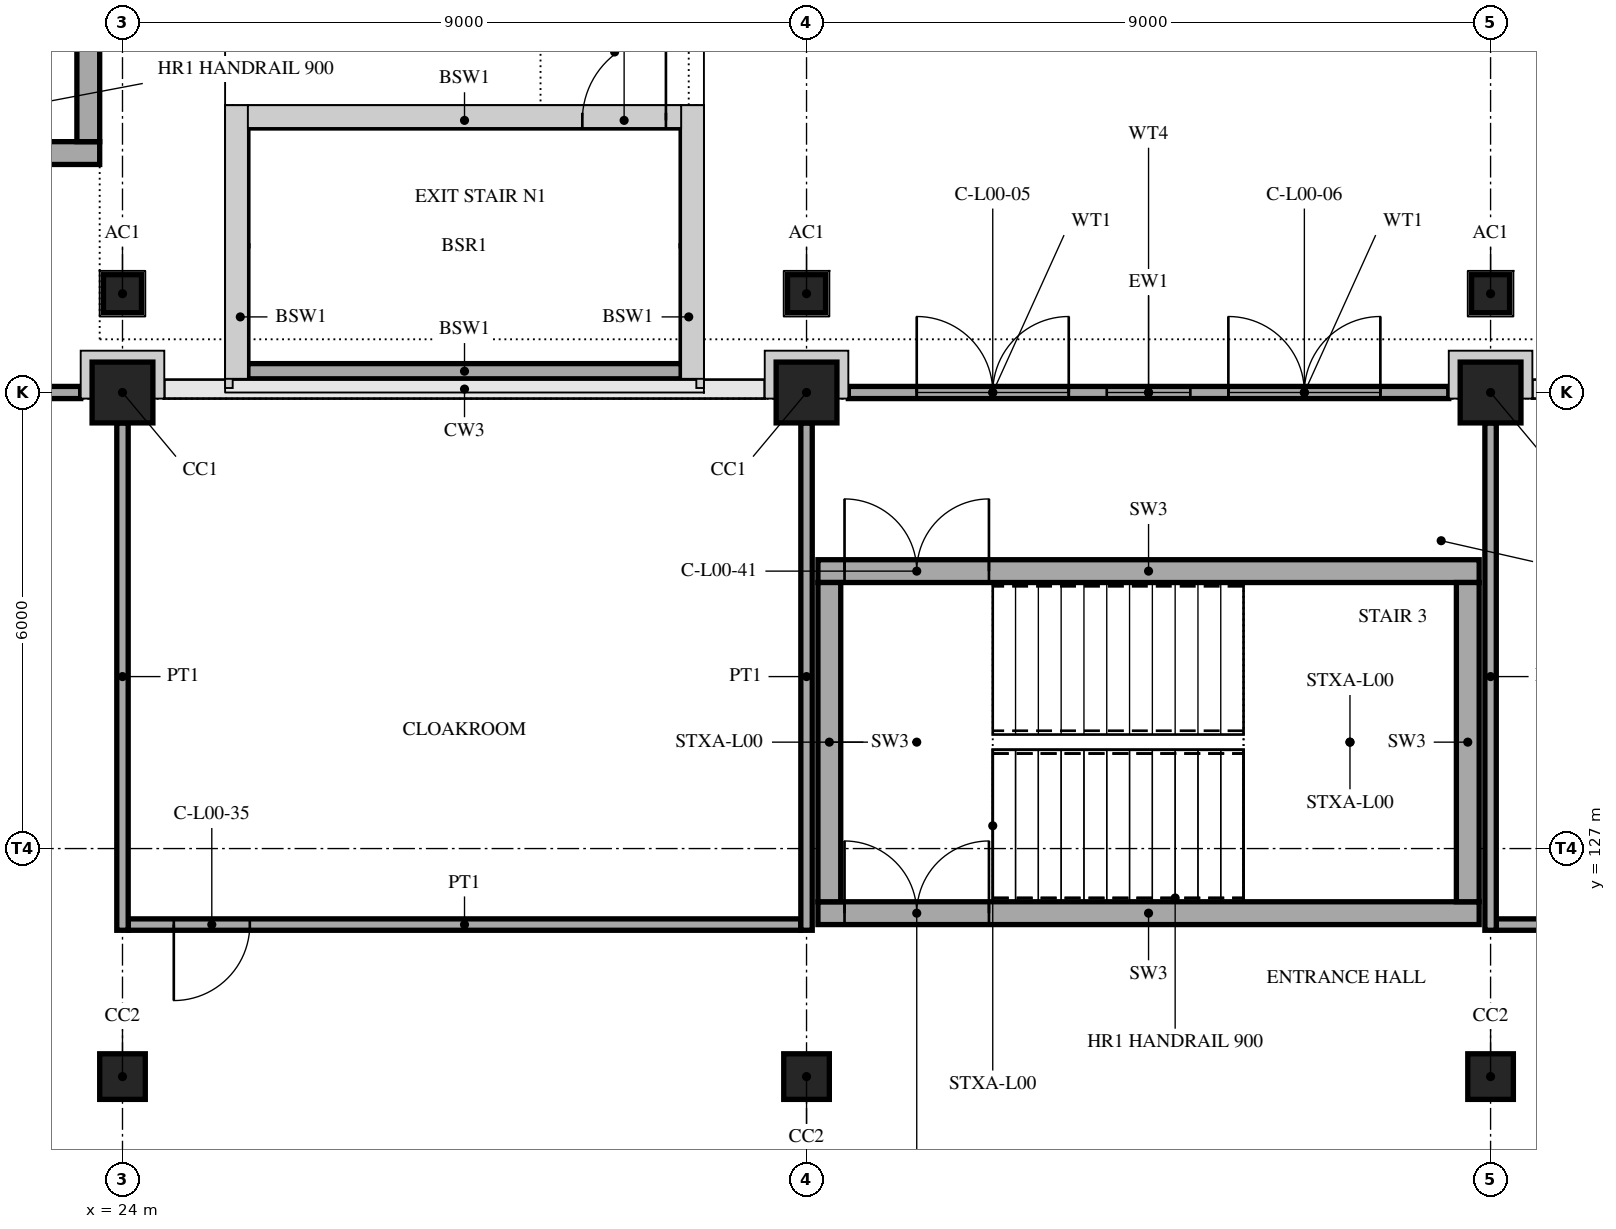
"""IFC4 building model, lengths in metres.
Left out: names, types, materials, properties, quantities, classifications, styles, units other than length and angle.
Written with IfcOpenShell. Run it as: python <this file> out.ifc"""

import sys

from ifc_helpers import new_model, si_unit, direction, frame, frame_2d, origin, origin_2d, place, context, subcontext, project, spatial, rectangle, extrude, element, fill, save


model = new_model("IFC4")
c1 = context("Model", 3, precision=1e-05, world=origin(), true_north=direction((0.0, 1.0)))
c2 = subcontext(c1, "Body", "Model", "MODEL_VIEW")
j1 = project(units=[si_unit("LENGTHUNIT", "METRE"), si_unit("PLANEANGLEUNIT", "RADIAN")], contexts=[c1])
p1 = place(None, origin())
s1 = spatial("IfcSite", under=j1, at=p1, CompositionType="ELEMENT")
p2 = place(p1, origin())
s2 = spatial("IfcBuilding", under=s1, at=p2, CompositionType="ELEMENT")
p3 = place(p2, origin())
s3 = spatial("IfcBuildingStorey", under=s2, at=p3, CompositionType="ELEMENT", Elevation=0.0)
p4 = place(p3, frame((24.0, 124.0, 0.0), z_axis=(0.0, 0.0, 1.0), x_axis=(1.0, 0.0, 0.0)))
e1 = element("IfcColumn", 1, at=p4, inside=s3, PredefinedType="COLUMN", context=c2, shape_type="SweptSolid", body=[
    extrude(rectangle(XDim=0.6, YDim=0.6, at=origin_2d()), origin(), (0.0, 0.0, 1.0), 5.0),
])
p5 = place(p3, frame((24.0, 133.0, 0.0), z_axis=(0.0, 0.0, 1.0), x_axis=(1.0, 0.0, 0.0)))
e2 = element("IfcColumn", 2, at=p5, inside=s3, PredefinedType="COLUMN", context=c2, shape_type="SweptSolid", body=[
    extrude(rectangle(XDim=0.8, YDim=0.8, at=origin_2d()), origin(), (0.0, 0.0, 1.0), 5.0),
])
p6 = place(p3, frame((33.0, 124.0, 0.0), z_axis=(0.0, 0.0, 1.0), x_axis=(1.0, 0.0, 0.0)))
e3 = element("IfcColumn", 3, at=p6, inside=s3, PredefinedType="COLUMN", context=c2, shape_type="SweptSolid", body=[
    extrude(rectangle(XDim=0.6, YDim=0.6, at=origin_2d()), origin(), (0.0, 0.0, 1.0), 5.0),
])
p7 = place(p3, frame((33.0, 133.0, 0.0), z_axis=(0.0, 0.0, 1.0), x_axis=(1.0, 0.0, 0.0)))
e4 = element("IfcColumn", 4, at=p7, inside=s3, PredefinedType="COLUMN", context=c2, shape_type="SweptSolid", body=[
    extrude(rectangle(XDim=0.8, YDim=0.8, at=origin_2d()), origin(), (0.0, 0.0, 1.0), 5.0),
])
p8 = place(p3, frame((42.0, 124.0, 0.0), z_axis=(0.0, 0.0, 1.0), x_axis=(1.0, 0.0, 0.0)))
e5 = element("IfcColumn", 5, at=p8, inside=s3, PredefinedType="COLUMN", context=c2, shape_type="SweptSolid", body=[
    extrude(rectangle(XDim=0.6, YDim=0.6, at=origin_2d()), origin(), (0.0, 0.0, 1.0), 5.0),
])
p9 = place(p3, frame((42.0, 133.0, 0.0), z_axis=(0.0, 0.0, 1.0), x_axis=(1.0, 0.0, 0.0)))
e6 = element("IfcColumn", 6, at=p9, inside=s3, PredefinedType="COLUMN", context=c2, shape_type="SweptSolid", body=[
    extrude(rectangle(XDim=0.8, YDim=0.8, at=origin_2d()), origin(), (0.0, 0.0, 1.0), 5.0),
])
p10 = place(p3, frame((33.15, 126.15, 0.0), z_axis=(0.0, 0.0, 1.0), x_axis=(1.0, 0.0, 0.0)))
e7 = element("IfcWall", 7, at=p10, inside=s3, PredefinedType="SHEAR", context=c2, shape_type="SweptSolid", body=[
    extrude(rectangle(XDim=8.7, YDim=0.3, at=frame_2d((4.35, 0.0))), origin(), (0.0, 0.0, 1.0), 5.0),
])
p11 = place(p10, frame((0.35, 0.0, 0.0)))
e8 = element("IfcOpeningElement", 8, at=p11, cuts=e7, PredefinedType="OPENING", context=c2, shape_type="SweptSolid", body=[
    extrude(rectangle(XDim=1.9, YDim=2.1, at=frame_2d((0.95, 1.05))), frame((0.0, 0.16, 0.0), z_axis=(0.0, -1.0, 0.0), x_axis=(1.0, 0.0, 0.0)), (0.0, 0.0, 1.0), 0.32),
])
p12 = place(p3, frame((33.15, 130.65, 0.0), z_axis=(0.0, 0.0, 1.0), x_axis=(1.0, 0.0, 0.0)))
e9 = element("IfcWall", 9, at=p12, inside=s3, PredefinedType="SHEAR", context=c2, shape_type="SweptSolid", body=[
    extrude(rectangle(XDim=8.7, YDim=0.3, at=frame_2d((4.35, 0.0))), origin(), (0.0, 0.0, 1.0), 5.0),
])
p13 = place(p12, frame((0.35, 0.0, 0.0)))
e10 = element("IfcOpeningElement", 10, at=p13, cuts=e9, PredefinedType="OPENING", context=c2, shape_type="SweptSolid", body=[
    extrude(rectangle(XDim=1.9, YDim=2.1, at=frame_2d((0.95, 1.05))), frame((0.0, 0.16, 0.0), z_axis=(0.0, -1.0, 0.0), x_axis=(1.0, 0.0, 0.0)), (0.0, 0.0, 1.0), 0.32),
])
for number, where, z_axis, x_axis in (
    (11, (33.3, 126.3, 0.0), (0.0, 0.0, 1.0), (0.0, 1.0, 0.0)),
    (12, (41.7, 126.3, 0.0), (0.0, 0.0, 1.0), (0.0, 1.0, 0.0)),
):
    element("IfcWall", number, at=place(p3, frame(where, z_axis=z_axis, x_axis=x_axis)), inside=s3, PredefinedType="SHEAR", context=c2, shape_type="SweptSolid", body=[
        extrude(rectangle(XDim=4.2, YDim=0.3, at=frame_2d((2.1, 0.0))), origin(), (0.0, 0.0, 1.0), 5.0),
    ])
p14 = place(p3, frame((31.45, 133.059, 0.0), z_axis=(0.0, 0.0, 1.0), x_axis=(0.0, 1.0, 0.0)))
e13 = element("IfcWall", 13, at=p14, inside=s3, PredefinedType="SOLIDWALL", context=c2, shape_type="SweptSolid", body=[
    extrude(rectangle(XDim=1.871, YDim=0.2, at=frame_2d((0.936, 0.0))), origin(), (0.0, 0.0, 1.0), 3.2),
])
p15 = place(p3, frame((31.45, 134.93, 0.0), z_axis=(0.0, 0.0, 1.0), x_axis=(0.0, 1.0, 0.0)))
e14 = element("IfcWall", 14, at=p15, inside=s3, PredefinedType="SOLIDWALL", context=c2, shape_type="SweptSolid", body=[
    extrude(rectangle(XDim=1.75, YDim=0.2, at=frame_2d((0.875, 0.0))), origin(), (0.0, 0.0, 1.0), 3.2),
])
p16 = place(p3, frame((25.55, 133.059, 0.0), z_axis=(0.0, 0.0, 1.0), x_axis=(0.0, 1.0, 0.0)))
e15 = element("IfcWall", 15, at=p16, inside=s3, PredefinedType="SOLIDWALL", context=c2, shape_type="SweptSolid", body=[
    extrude(rectangle(XDim=1.871, YDim=0.2, at=frame_2d((0.936, 0.0))), origin(), (0.0, 0.0, 1.0), 3.2),
])
p17 = place(p3, frame((25.55, 134.93, 0.0), z_axis=(0.0, 0.0, 1.0), x_axis=(0.0, 1.0, 0.0)))
e16 = element("IfcWall", 16, at=p17, inside=s3, PredefinedType="SOLIDWALL", context=c2, shape_type="SweptSolid", body=[
    extrude(rectangle(XDim=1.75, YDim=0.2, at=frame_2d((0.875, 0.0))), origin(), (0.0, 0.0, 1.0), 3.2),
])
p18 = place(p3, frame((31.35, 136.58, 0.0), z_axis=(0.0, 0.0, 1.0), x_axis=(-1.0, 0.0, 0.0)))
e17 = element("IfcWall", 17, at=p18, inside=s3, PredefinedType="SOLIDWALL", context=c2, shape_type="SweptSolid", body=[
    extrude(rectangle(XDim=5.7, YDim=0.2, at=frame_2d((2.85, 0.0))), origin(), (0.0, 0.0, 1.0), 3.2),
])
p19 = place(p18, frame((0.2, 0.0, 0.0)))
e18 = element("IfcOpeningElement", 18, at=p19, cuts=e17, PredefinedType="OPENING", context=c2, shape_type="SweptSolid", body=[
    extrude(rectangle(XDim=1.1, YDim=2.1, at=frame_2d((0.55, 1.05))), frame((0.0, 0.11, 0.0), z_axis=(0.0, -1.0, 0.0), x_axis=(1.0, 0.0, 0.0)), (0.0, 0.0, 1.0), 0.22),
])
p20 = place(p3, frame((31.35, 133.28, 0.0), z_axis=(0.0, 0.0, 1.0), x_axis=(-1.0, 0.0, 0.0)))
e19 = element("IfcWall", 19, at=p20, inside=s3, PredefinedType="SOLIDWALL", context=c2, shape_type="SweptSolid", body=[
    extrude(rectangle(XDim=5.7, YDim=0.2, at=frame_2d((2.85, 0.0))), origin(), (0.0, 0.0, 1.0), 3.2),
])
p21 = place(p3, frame((15.55, 133.0, 0.0), z_axis=(0.0, 0.0, 1.0), x_axis=(1.0, 0.0, 0.0)))
e20 = element("IfcWall", 20, at=p21, inside=s3, PredefinedType="STANDARD", context=c2, shape_type="SweptSolid", body=[
    extrude(rectangle(XDim=7.9, YDim=0.16, at=frame_2d((3.95, 0.0))), origin(), (0.0, 0.0, 1.0), 5.0),
])
p22 = place(p21, frame((0.9, 0.0, 0.0)))
e21 = element("IfcOpeningElement", 21, at=p22, cuts=e20, PredefinedType="OPENING", context=c2, shape_type="SweptSolid", body=[
    extrude(rectangle(XDim=2.0, YDim=2.4, at=frame_2d((1.0, 1.2))), frame((0.0, 0.09, 0.0), z_axis=(0.0, -1.0, 0.0), x_axis=(1.0, 0.0, 0.0)), (0.0, 0.0, 1.0), 0.18),
])
p23 = place(p21, frame((0.9, 0.0, 2.6)))
e22 = element("IfcOpeningElement", 22, at=p23, cuts=e20, PredefinedType="OPENING", context=c2, shape_type="SweptSolid", body=[
    extrude(rectangle(XDim=2.0, YDim=2.1, at=frame_2d((1.0, 1.05))), frame((0.0, 0.09, 0.0), z_axis=(0.0, -1.0, 0.0), x_axis=(1.0, 0.0, 0.0)), (0.0, 0.0, 1.0), 0.18),
])
p24 = place(p21, frame((5.0, 0.0, 0.0)))
e23 = element("IfcOpeningElement", 23, at=p24, cuts=e20, PredefinedType="OPENING", context=c2, shape_type="SweptSolid", body=[
    extrude(rectangle(XDim=2.0, YDim=2.4, at=frame_2d((1.0, 1.2))), frame((0.0, 0.09, 0.0), z_axis=(0.0, -1.0, 0.0), x_axis=(1.0, 0.0, 0.0)), (0.0, 0.0, 1.0), 0.18),
])
p25 = place(p21, frame((5.0, 0.0, 2.6)))
e24 = element("IfcOpeningElement", 24, at=p25, cuts=e20, PredefinedType="OPENING", context=c2, shape_type="SweptSolid", body=[
    extrude(rectangle(XDim=2.0, YDim=2.1, at=frame_2d((1.0, 1.05))), frame((0.0, 0.09, 0.0), z_axis=(0.0, -1.0, 0.0), x_axis=(1.0, 0.0, 0.0)), (0.0, 0.0, 1.0), 0.18),
])
p26 = place(p21, frame((3.4, 0.0, 0.9)))
e25 = element("IfcOpeningElement", 25, at=p26, cuts=e20, PredefinedType="OPENING", context=c2, shape_type="SweptSolid", body=[
    extrude(rectangle(XDim=1.1, YDim=3.8, at=frame_2d((0.55, 1.9))), frame((0.0, 0.09, 0.0), z_axis=(0.0, -1.0, 0.0), x_axis=(1.0, 0.0, 0.0)), (0.0, 0.0, 1.0), 0.18),
])
p27 = place(p3, frame((33.55, 133.0, 0.0), z_axis=(0.0, 0.0, 1.0), x_axis=(1.0, 0.0, 0.0)))
e26 = element("IfcWall", 26, at=p27, inside=s3, PredefinedType="STANDARD", context=c2, shape_type="SweptSolid", body=[
    extrude(rectangle(XDim=7.9, YDim=0.16, at=frame_2d((3.95, 0.0))), origin(), (0.0, 0.0, 1.0), 5.0),
])
p28 = place(p27, frame((0.9, 0.0, 0.0)))
e27 = element("IfcOpeningElement", 27, at=p28, cuts=e26, PredefinedType="OPENING", context=c2, shape_type="SweptSolid", body=[
    extrude(rectangle(XDim=2.0, YDim=2.4, at=frame_2d((1.0, 1.2))), frame((0.0, 0.09, 0.0), z_axis=(0.0, -1.0, 0.0), x_axis=(1.0, 0.0, 0.0)), (0.0, 0.0, 1.0), 0.18),
])
p29 = place(p27, frame((0.9, 0.0, 2.6)))
e28 = element("IfcOpeningElement", 28, at=p29, cuts=e26, PredefinedType="OPENING", context=c2, shape_type="SweptSolid", body=[
    extrude(rectangle(XDim=2.0, YDim=2.1, at=frame_2d((1.0, 1.05))), frame((0.0, 0.09, 0.0), z_axis=(0.0, -1.0, 0.0), x_axis=(1.0, 0.0, 0.0)), (0.0, 0.0, 1.0), 0.18),
])
p30 = place(p27, frame((5.0, 0.0, 0.0)))
e29 = element("IfcOpeningElement", 29, at=p30, cuts=e26, PredefinedType="OPENING", context=c2, shape_type="SweptSolid", body=[
    extrude(rectangle(XDim=2.0, YDim=2.4, at=frame_2d((1.0, 1.2))), frame((0.0, 0.09, 0.0), z_axis=(0.0, -1.0, 0.0), x_axis=(1.0, 0.0, 0.0)), (0.0, 0.0, 1.0), 0.18),
])
p31 = place(p27, frame((5.0, 0.0, 2.6)))
e30 = element("IfcOpeningElement", 30, at=p31, cuts=e26, PredefinedType="OPENING", context=c2, shape_type="SweptSolid", body=[
    extrude(rectangle(XDim=2.0, YDim=2.1, at=frame_2d((1.0, 1.05))), frame((0.0, 0.09, 0.0), z_axis=(0.0, -1.0, 0.0), x_axis=(1.0, 0.0, 0.0)), (0.0, 0.0, 1.0), 0.18),
])
p32 = place(p27, frame((3.4, 0.0, 0.9)))
e31 = element("IfcOpeningElement", 31, at=p32, cuts=e26, PredefinedType="OPENING", context=c2, shape_type="SweptSolid", body=[
    extrude(rectangle(XDim=1.1, YDim=3.8, at=frame_2d((0.55, 1.9))), frame((0.0, 0.09, 0.0), z_axis=(0.0, -1.0, 0.0), x_axis=(1.0, 0.0, 0.0)), (0.0, 0.0, 1.0), 0.18),
])
for number, where, z_axis, x_axis in (
    (32, (24.0, 134.3, -0.2), (0.0, 0.0, 1.0), (1.0, 0.0, 0.0)),
    (33, (33.0, 134.3, -0.2), (0.0, 0.0, 1.0), (1.0, 0.0, 0.0)),
    (34, (42.0, 134.3, -0.2), (0.0, 0.0, 1.0), (1.0, 0.0, 0.0)),
):
    element("IfcColumn", number, at=place(p3, frame(where, z_axis=z_axis, x_axis=x_axis)), inside=s3, PredefinedType="COLUMN", context=c2, shape_type="SweptSolid", body=[
        extrude(rectangle(XDim=0.5, YDim=0.5, at=origin_2d()), origin(), (0.0, 0.0, 1.0), 4.95),
    ])
p33 = place(p3, frame((15.8, 136.15, -0.4), z_axis=(0.0, 0.0, 1.0), x_axis=(1.0, 0.0, 0.0)))
e35 = element("IfcWall", 35, at=p33, inside=s3, PredefinedType="SHEAR", context=c2, shape_type="SweptSolid", body=[
    extrude(rectangle(XDim=7.9, YDim=0.3, at=frame_2d((3.95, 0.0))), origin(), (0.0, 0.0, 1.0), 5.4),
])
p34 = place(p3, frame((23.55, 136.3, -0.4), z_axis=(0.0, 0.0, 1.0), x_axis=(0.0, 1.0, 0.0)))
e36 = element("IfcWall", 36, at=p34, inside=s3, PredefinedType="SHEAR", context=c2, shape_type="SweptSolid", body=[
    extrude(rectangle(XDim=4.2, YDim=0.3, at=frame_2d((2.1, 0.0))), origin(), (0.0, 0.0, 1.0), 5.4),
])
p35 = place(p3, frame((24.075, 126.0, 0.0), z_axis=(0.0, 0.0, 1.0), x_axis=(1.0, 0.0, 0.0)))
e37 = element("IfcWall", 37, at=p35, inside=s3, PredefinedType="PARTITIONING", context=c2, shape_type="SweptSolid", body=[
    extrude(rectangle(XDim=8.85, YDim=0.15, at=frame_2d((4.425, 0.0))), origin(), (0.0, 0.0, 1.0), 4.8),
])
p36 = place(p35, frame((0.6, 0.0, 0.0)))
e38 = element("IfcOpeningElement", 38, at=p36, cuts=e37, PredefinedType="OPENING", context=c2, shape_type="SweptSolid", body=[
    extrude(rectangle(XDim=1.0, YDim=2.1, at=frame_2d((0.5, 1.05))), frame((0.0, 0.085, 0.0), z_axis=(0.0, -1.0, 0.0), x_axis=(1.0, 0.0, 0.0)), (0.0, 0.0, 1.0), 0.17),
])
for number, where, z_axis, x_axis in (
    (39, (24.0, 125.925, 0.0), (0.0, 0.0, 1.0), (0.0, 1.0, 0.0)),
    (40, (33.0, 125.925, 0.0), (0.0, 0.0, 1.0), (0.0, 1.0, 0.0)),
):
    element("IfcWall", number, at=place(p3, frame(where, z_axis=z_axis, x_axis=x_axis)), inside=s3, PredefinedType="PARTITIONING", context=c2, shape_type="SweptSolid", body=[
        extrude(rectangle(XDim=6.675, YDim=0.15, at=frame_2d((3.337, 0.0))), origin(), (0.0, 0.0, 1.0), 4.0),
    ])
p37 = place(p3, frame((42.075, 126.0, 0.0), z_axis=(0.0, 0.0, 1.0), x_axis=(1.0, 0.0, 0.0)))
e41 = element("IfcWall", 41, at=p37, inside=s3, PredefinedType="PARTITIONING", context=c2, shape_type="SweptSolid", body=[
    extrude(rectangle(XDim=8.85, YDim=0.15, at=frame_2d((4.425, 0.0))), origin(), (0.0, 0.0, 1.0), 4.8),
])
p38 = place(p37, frame((0.6, 0.0, 0.0)))
e42 = element("IfcOpeningElement", 42, at=p38, cuts=e41, PredefinedType="OPENING", context=c2, shape_type="SweptSolid", body=[
    extrude(rectangle(XDim=1.0, YDim=2.1, at=frame_2d((0.5, 1.05))), frame((0.0, 0.085, 0.0), z_axis=(0.0, -1.0, 0.0), x_axis=(1.0, 0.0, 0.0)), (0.0, 0.0, 1.0), 0.17),
])
p39 = place(p3, frame((42.0, 125.925, 0.0), z_axis=(0.0, 0.0, 1.0), x_axis=(0.0, 1.0, 0.0)))
e43 = element("IfcWall", 43, at=p39, inside=s3, PredefinedType="PARTITIONING", context=c2, shape_type="SweptSolid", body=[
    extrude(rectangle(XDim=6.675, YDim=0.15, at=frame_2d((3.337, 0.0))), origin(), (0.0, 0.0, 1.0), 4.0),
])
p40 = place(p19, frame((1.1, 0.0, 0.0), z_axis=(0.0, 0.0, 1.0), x_axis=(-1.0, 0.0, 0.0)))
e44 = element("IfcDoor", 44, at=p40, inside=s3, OperationType="SINGLE_SWING_RIGHT", PredefinedType="DOOR", context=c2, shape_type="SweptSolid", body=[
    extrude(rectangle(XDim=1.1, YDim=2.1, at=frame_2d((0.55, 1.05))), frame((0.0, 0.025, 0.0), z_axis=(0.0, -1.0, 0.0), x_axis=(1.0, 0.0, 0.0)), (0.0, 0.0, 1.0), 0.05),
])
fill(e18, e44)
p41 = place(p28, origin())
e45 = element("IfcDoor", 45, at=p41, inside=s3, OperationType="DOUBLE_DOOR_SINGLE_SWING", PredefinedType="NOTDEFINED", context=c2, shape_type="SweptSolid", body=[
    extrude(rectangle(XDim=2.0, YDim=2.4, at=frame_2d((1.0, 1.2))), frame((0.0, 0.025, 0.0), z_axis=(0.0, -1.0, 0.0), x_axis=(1.0, 0.0, 0.0)), (0.0, 0.0, 1.0), 0.05),
])
fill(e27, e45)
p42 = place(p29, origin())
e46 = element("IfcWindow", 46, at=p42, inside=s3, PartitioningType="SINGLE_PANEL", PredefinedType="WINDOW", context=c2, shape_type="SweptSolid", body=[
    extrude(rectangle(XDim=2.0, YDim=2.1, at=frame_2d((1.0, 1.05))), frame((0.0, 0.03, 0.0), z_axis=(0.0, -1.0, 0.0), x_axis=(1.0, 0.0, 0.0)), (0.0, 0.0, 1.0), 0.06),
])
fill(e28, e46)
p43 = place(p30, origin())
e47 = element("IfcDoor", 47, at=p43, inside=s3, OperationType="DOUBLE_DOOR_SINGLE_SWING", PredefinedType="NOTDEFINED", context=c2, shape_type="SweptSolid", body=[
    extrude(rectangle(XDim=2.0, YDim=2.4, at=frame_2d((1.0, 1.2))), frame((0.0, 0.025, 0.0), z_axis=(0.0, -1.0, 0.0), x_axis=(1.0, 0.0, 0.0)), (0.0, 0.0, 1.0), 0.05),
])
fill(e29, e47)
p44 = place(p31, origin())
e48 = element("IfcWindow", 48, at=p44, inside=s3, PartitioningType="SINGLE_PANEL", PredefinedType="WINDOW", context=c2, shape_type="SweptSolid", body=[
    extrude(rectangle(XDim=2.0, YDim=2.1, at=frame_2d((1.0, 1.05))), frame((0.0, 0.03, 0.0), z_axis=(0.0, -1.0, 0.0), x_axis=(1.0, 0.0, 0.0)), (0.0, 0.0, 1.0), 0.06),
])
fill(e30, e48)
p45 = place(p32, origin())
e49 = element("IfcWindow", 49, at=p45, inside=s3, PartitioningType="SINGLE_PANEL", PredefinedType="WINDOW", context=c2, shape_type="SweptSolid", body=[
    extrude(rectangle(XDim=1.1, YDim=3.8, at=frame_2d((0.55, 1.9))), frame((0.0, 0.03, 0.0), z_axis=(0.0, -1.0, 0.0), x_axis=(1.0, 0.0, 0.0)), (0.0, 0.0, 1.0), 0.06),
])
fill(e31, e49)
p46 = place(p11, origin())
e50 = element("IfcDoor", 50, at=p46, inside=s3, OperationType="DOUBLE_DOOR_SINGLE_SWING", PredefinedType="NOTDEFINED", context=c2, shape_type="SweptSolid", body=[
    extrude(rectangle(XDim=1.9, YDim=2.1, at=frame_2d((0.95, 1.05))), frame((0.0, 0.025, 0.0), z_axis=(0.0, -1.0, 0.0), x_axis=(1.0, 0.0, 0.0)), (0.0, 0.0, 1.0), 0.05),
])
fill(e8, e50)
p47 = place(p36, frame((1.0, 0.0, 0.0), z_axis=(0.0, 0.0, 1.0), x_axis=(-1.0, 0.0, 0.0)))
e51 = element("IfcDoor", 51, at=p47, inside=s3, OperationType="SINGLE_SWING_RIGHT", PredefinedType="NOTDEFINED", context=c2, shape_type="SweptSolid", body=[
    extrude(rectangle(XDim=1.0, YDim=2.1, at=frame_2d((0.5, 1.05))), frame((0.0, 0.025, 0.0), z_axis=(0.0, -1.0, 0.0), x_axis=(1.0, 0.0, 0.0)), (0.0, 0.0, 1.0), 0.05),
])
fill(e38, e51)
p48 = place(p13, origin())
e52 = element("IfcDoor", 52, at=p48, inside=s3, OperationType="DOUBLE_DOOR_SINGLE_SWING", PredefinedType="NOTDEFINED", context=c2, shape_type="SweptSolid", body=[
    extrude(rectangle(XDim=1.9, YDim=2.1, at=frame_2d((0.95, 1.05))), frame((0.0, 0.025, 0.0), z_axis=(0.0, -1.0, 0.0), x_axis=(1.0, 0.0, 0.0)), (0.0, 0.0, 1.0), 0.05),
])
fill(e10, e52)
save(model, sys.argv[1])
